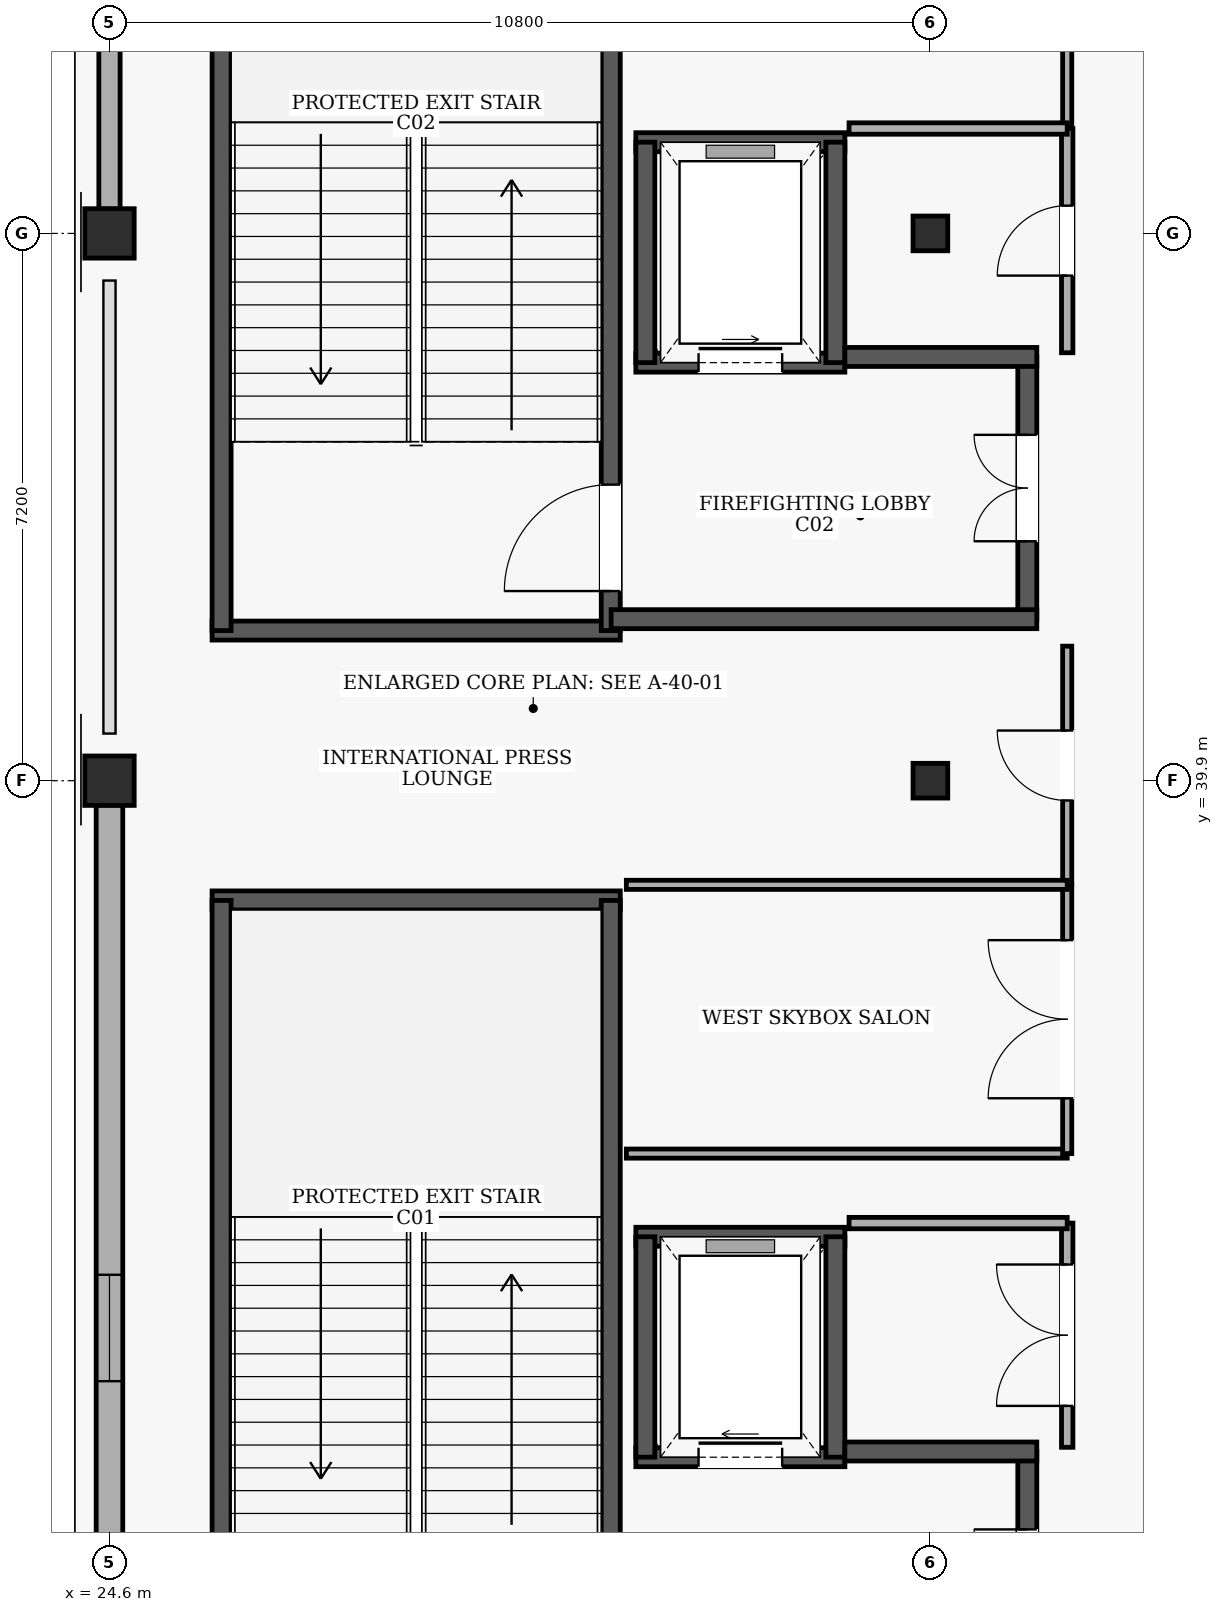
"""IFC4 building model, lengths in metres.
Left out: names, types, materials, properties, quantities, classifications, styles, units other than length and angle.
Written with IfcOpenShell. Run it as: python <this file> out.ifc"""

import sys

from ifc_helpers import new_model, si_unit, direction, frame, frame_2d, origin, origin_2d, place, context, subcontext, project, spatial, rectangle, hollow_circle, extrude, element, fill, save


model = new_model("IFC4")
c1 = context("Model", 3, precision=1e-05, world=origin(), true_north=direction((0.0, 1.0)))
c2 = subcontext(c1, "Body", "Model", "MODEL_VIEW")
j1 = project(units=[si_unit("LENGTHUNIT", "METRE"), si_unit("PLANEANGLEUNIT", "RADIAN")], contexts=[c1])
p1 = place(None, origin())
s1 = spatial("IfcSite", under=j1, at=p1, CompositionType="ELEMENT")
p2 = place(p1, origin())
s2 = spatial("IfcBuilding", under=s1, at=p2, CompositionType="ELEMENT")
p3 = place(p2, frame((0.0, 0.0, 19.8)))
s3 = spatial("IfcBuildingStorey", under=s2, at=p3, CompositionType="ELEMENT", Elevation=19.8)
for number, where, z_axis, x_axis in (
    (1, (24.6, 39.9, 0.0), (0.0, 0.0, 1.0), (1.0, 0.0, 0.0)),
    (2, (24.6, 47.1, 0.0), (0.0, 0.0, 1.0), (1.0, 0.0, 0.0)),
):
    element("IfcColumn", number, at=place(p3, frame(where, z_axis=z_axis, x_axis=x_axis)), inside=s3, PredefinedType="COLUMN", context=c2, shape_type="SweptSolid", body=[
        extrude(rectangle(XDim=0.65, YDim=0.65, at=origin_2d()), origin(), (0.0, 0.0, 1.0), 4.8),
    ])
for number, where, z_axis, x_axis in (
    (3, (35.4, 39.9, 0.0), (0.0, 0.0, 1.0), (1.0, 0.0, 0.0)),
    (4, (35.4, 47.1, 0.0), (0.0, 0.0, 1.0), (1.0, 0.0, 0.0)),
):
    element("IfcColumn", number, at=place(p3, frame(where, z_axis=z_axis, x_axis=x_axis)), inside=s3, PredefinedType="COLUMN", context=c2, shape_type="SweptSolid", body=[
        extrude(hollow_circle(Radius=0.229, WallThickness=0.02, at=origin_2d()), origin(), (0.0, 0.0, 1.0), 4.8),
    ])
p4 = place(p3, frame((24.6, 25.82, 0.0), z_axis=(0.0, 0.0, 1.0), x_axis=(0.0, 1.0, 0.0)))
e5 = element("IfcWall", 5, at=p4, inside=s3, PredefinedType="SOLIDWALL", context=c2, shape_type="SweptSolid", body=[
    extrude(rectangle(XDim=13.76, YDim=0.35, at=frame_2d((6.88, 0.0))), origin(), (0.0, 0.0, 1.0), 3.58),
])
p5 = place(p4, frame((6.18, 0.0, 0.9)))
e6 = element("IfcOpeningElement", 6, at=p5, cuts=e5, PredefinedType="OPENING", context=c2, shape_type="SweptSolid", body=[
    extrude(rectangle(XDim=1.4, YDim=1.5, at=frame_2d((0.7, 0.75))), frame((0.0, 0.185, 0.0), z_axis=(0.0, -1.0, 0.0), x_axis=(1.0, 0.0, 0.0)), (0.0, 0.0, 1.0), 0.37),
])
p6 = place(p3, frame((24.6, 47.42, 0.0), z_axis=(0.0, 0.0, 1.0), x_axis=(0.0, 1.0, 0.0)))
e7 = element("IfcWall", 7, at=p6, inside=s3, PredefinedType="SOLIDWALL", context=c2, shape_type="SweptSolid", body=[
    extrude(rectangle(XDim=6.56, YDim=0.28, at=frame_2d((3.28, 0.0))), origin(), (0.0, 0.0, 1.0), 3.88),
])
p7 = place(p6, frame((2.48, 0.0, 0.9)))
e8 = element("IfcOpeningElement", 8, at=p7, cuts=e7, PredefinedType="OPENING", context=c2, shape_type="SweptSolid", body=[
    extrude(rectangle(XDim=1.6, YDim=1.5, at=frame_2d((0.8, 0.75))), frame((0.0, 0.15, 0.0), z_axis=(0.0, -1.0, 0.0), x_axis=(1.0, 0.0, 0.0)), (0.0, 0.0, 1.0), 0.3),
])
p8 = place(p3, frame((31.32, 38.325, 0.0), z_axis=(0.0, 0.0, 1.0), x_axis=(-1.0, 0.0, 0.0)))
e9 = element("IfcWall", 9, at=p8, inside=s3, PredefinedType="SHEAR", context=c2, shape_type="SweptSolid", body=[
    extrude(rectangle(XDim=5.37, YDim=0.25, at=frame_2d((2.685, 0.0))), origin(), (0.0, 0.0, 1.0), 4.5),
])
p9 = place(p3, frame((26.075, 27.475, 0.0), z_axis=(0.0, 0.0, 1.0), x_axis=(0.0, 1.0, 0.0)))
e10 = element("IfcWall", 10, at=p9, inside=s3, PredefinedType="SHEAR", context=c2, shape_type="SweptSolid", body=[
    extrude(rectangle(XDim=10.85, YDim=0.25, at=frame_2d((5.425, 0.0))), origin(), (0.0, 0.0, 1.0), 4.5),
])
p10 = place(p3, frame((31.195, 27.475, 0.0), z_axis=(0.0, 0.0, 1.0), x_axis=(0.0, 1.0, 0.0)))
e11 = element("IfcWall", 11, at=p10, inside=s3, PredefinedType="SHEAR", context=c2, shape_type="SweptSolid", body=[
    extrude(rectangle(XDim=10.85, YDim=0.25, at=frame_2d((5.425, 0.0))), origin(), (0.0, 0.0, 1.0), 4.5),
])
p11 = place(p10, frame((0.52, 0.0, 0.0)))
e12 = element("IfcOpeningElement", 12, at=p11, cuts=e11, PredefinedType="OPENING", context=c2, shape_type="SweptSolid", body=[
    extrude(rectangle(XDim=1.4, YDim=2.15, at=frame_2d((0.7, 1.075))), frame((0.0, 0.135, 0.0), z_axis=(0.0, -1.0, 0.0), x_axis=(1.0, 0.0, 0.0)), (0.0, 0.0, 1.0), 0.27),
])
p12 = place(p3, frame((25.95, 41.875, 0.0), z_axis=(0.0, 0.0, 1.0), x_axis=(1.0, 0.0, 0.0)))
e13 = element("IfcWall", 13, at=p12, inside=s3, PredefinedType="SHEAR", context=c2, shape_type="SweptSolid", body=[
    extrude(rectangle(XDim=5.37, YDim=0.25, at=frame_2d((2.685, 0.0))), origin(), (0.0, 0.0, 1.0), 4.5),
])
p13 = place(p3, frame((26.075, 41.875, 0.0), z_axis=(0.0, 0.0, 1.0), x_axis=(0.0, 1.0, 0.0)))
e14 = element("IfcWall", 14, at=p13, inside=s3, PredefinedType="SHEAR", context=c2, shape_type="SweptSolid", body=[
    extrude(rectangle(XDim=10.85, YDim=0.25, at=frame_2d((5.425, 0.0))), origin(), (0.0, 0.0, 1.0), 4.5),
])
p14 = place(p3, frame((31.195, 41.875, 0.0), z_axis=(0.0, 0.0, 1.0), x_axis=(0.0, 1.0, 0.0)))
e15 = element("IfcWall", 15, at=p14, inside=s3, PredefinedType="SHEAR", context=c2, shape_type="SweptSolid", body=[
    extrude(rectangle(XDim=10.85, YDim=0.25, at=frame_2d((5.425, 0.0))), origin(), (0.0, 0.0, 1.0), 4.5),
])
p15 = place(p14, frame((0.52, 0.0, 0.0)))
e16 = element("IfcOpeningElement", 16, at=p15, cuts=e15, PredefinedType="OPENING", context=c2, shape_type="SweptSolid", body=[
    extrude(rectangle(XDim=1.4, YDim=2.15, at=frame_2d((0.7, 1.075))), frame((0.0, 0.135, 0.0), z_axis=(0.0, -1.0, 0.0), x_axis=(1.0, 0.0, 0.0)), (0.0, 0.0, 1.0), 0.27),
])
p16 = place(p3, frame((31.525, 31.0, 0.0), z_axis=(0.0, 0.0, 1.0), x_axis=(1.0, 0.0, 0.0)))
e17 = element("IfcWall", 17, at=p16, inside=s3, PredefinedType="SHEAR", context=c2, shape_type="SweptSolid", body=[
    extrude(rectangle(XDim=2.75, YDim=0.25, at=frame_2d((1.375, 0.0))), origin(), (0.0, 0.0, 1.0), 4.5),
])
p17 = place(p16, frame((0.825, 0.0, 0.0)))
e18 = element("IfcOpeningElement", 18, at=p17, cuts=e17, PredefinedType="OPENING", context=c2, shape_type="SweptSolid", body=[
    extrude(rectangle(XDim=1.1, YDim=2.15, at=frame_2d((0.55, 1.075))), frame((0.0, 0.135, 0.0), z_axis=(0.0, -1.0, 0.0), x_axis=(1.0, 0.0, 0.0)), (0.0, 0.0, 1.0), 0.27),
])
p18 = place(p3, frame((34.275, 33.9, 0.0), z_axis=(0.0, 0.0, 1.0), x_axis=(-1.0, 0.0, 0.0)))
e19 = element("IfcWall", 19, at=p18, inside=s3, PredefinedType="SHEAR", context=c2, shape_type="SweptSolid", body=[
    extrude(rectangle(XDim=2.75, YDim=0.25, at=frame_2d((1.375, 0.0))), origin(), (0.0, 0.0, 1.0), 4.5),
])
for number, where, z_axis, x_axis in (
    (20, (31.65, 33.9, 0.0), (0.0, 0.0, 1.0), (0.0, -1.0, 0.0)),
    (21, (34.15, 31.0, 0.0), (0.0, 0.0, 1.0), (0.0, 1.0, 0.0)),
):
    element("IfcWall", number, at=place(p3, frame(where, z_axis=z_axis, x_axis=x_axis)), inside=s3, PredefinedType="SHEAR", context=c2, shape_type="SweptSolid", body=[
        extrude(rectangle(XDim=2.9, YDim=0.25, at=frame_2d((1.45, 0.0))), origin(), (0.0, 0.0, 1.0), 4.5),
    ])
p19 = place(p3, frame((36.675, 27.625, 0.0), z_axis=(0.0, 0.0, 1.0), x_axis=(0.0, 1.0, 0.0)))
e22 = element("IfcWall", 22, at=p19, inside=s3, PredefinedType="SHEAR", context=c2, shape_type="SweptSolid", body=[
    extrude(rectangle(XDim=3.45, YDim=0.25, at=frame_2d((1.725, 0.0))), origin(), (0.0, 0.0, 1.0), 4.5),
])
p20 = place(p19, frame((1.025, 0.0, 0.0)))
e23 = element("IfcOpeningElement", 23, at=p20, cuts=e22, PredefinedType="OPENING", context=c2, shape_type="SweptSolid", body=[
    extrude(rectangle(XDim=1.4, YDim=2.15, at=frame_2d((0.7, 1.075))), frame((0.0, 0.135, 0.0), z_axis=(0.0, -1.0, 0.0), x_axis=(1.0, 0.0, 0.0)), (0.0, 0.0, 1.0), 0.27),
])
p21 = place(p3, frame((34.275, 31.075, 0.0), z_axis=(0.0, 0.0, 1.0), x_axis=(1.0, 0.0, 0.0)))
e24 = element("IfcWall", 24, at=p21, inside=s3, PredefinedType="SHEAR", context=c2, shape_type="SweptSolid", body=[
    extrude(rectangle(XDim=2.525, YDim=0.25, at=frame_2d((1.263, 0.0))), origin(), (0.0, 0.0, 1.0), 4.5),
])
p22 = place(p3, frame((31.525, 45.4, 0.0), z_axis=(0.0, 0.0, 1.0), x_axis=(1.0, 0.0, 0.0)))
e25 = element("IfcWall", 25, at=p22, inside=s3, PredefinedType="SHEAR", context=c2, shape_type="SweptSolid", body=[
    extrude(rectangle(XDim=2.75, YDim=0.25, at=frame_2d((1.375, 0.0))), origin(), (0.0, 0.0, 1.0), 4.5),
])
p23 = place(p22, frame((0.825, 0.0, 0.0)))
e26 = element("IfcOpeningElement", 26, at=p23, cuts=e25, PredefinedType="OPENING", context=c2, shape_type="SweptSolid", body=[
    extrude(rectangle(XDim=1.1, YDim=2.15, at=frame_2d((0.55, 1.075))), frame((0.0, 0.135, 0.0), z_axis=(0.0, -1.0, 0.0), x_axis=(1.0, 0.0, 0.0)), (0.0, 0.0, 1.0), 0.27),
])
p24 = place(p3, frame((34.275, 48.3, 0.0), z_axis=(0.0, 0.0, 1.0), x_axis=(-1.0, 0.0, 0.0)))
e27 = element("IfcWall", 27, at=p24, inside=s3, PredefinedType="SHEAR", context=c2, shape_type="SweptSolid", body=[
    extrude(rectangle(XDim=2.75, YDim=0.25, at=frame_2d((1.375, 0.0))), origin(), (0.0, 0.0, 1.0), 4.5),
])
for number, where, z_axis, x_axis in (
    (28, (31.65, 48.3, 0.0), (0.0, 0.0, 1.0), (0.0, -1.0, 0.0)),
    (29, (34.15, 45.4, 0.0), (0.0, 0.0, 1.0), (0.0, 1.0, 0.0)),
):
    element("IfcWall", number, at=place(p3, frame(where, z_axis=z_axis, x_axis=x_axis)), inside=s3, PredefinedType="SHEAR", context=c2, shape_type="SweptSolid", body=[
        extrude(rectangle(XDim=2.9, YDim=0.25, at=frame_2d((1.45, 0.0))), origin(), (0.0, 0.0, 1.0), 4.5),
    ])
p25 = place(p3, frame((36.675, 42.025, 0.0), z_axis=(0.0, 0.0, 1.0), x_axis=(0.0, 1.0, 0.0)))
e30 = element("IfcWall", 30, at=p25, inside=s3, PredefinedType="SHEAR", context=c2, shape_type="SweptSolid", body=[
    extrude(rectangle(XDim=3.45, YDim=0.25, at=frame_2d((1.725, 0.0))), origin(), (0.0, 0.0, 1.0), 4.5),
])
p26 = place(p25, frame((1.025, 0.0, 0.0)))
e31 = element("IfcOpeningElement", 31, at=p26, cuts=e30, PredefinedType="OPENING", context=c2, shape_type="SweptSolid", body=[
    extrude(rectangle(XDim=1.4, YDim=2.15, at=frame_2d((0.7, 1.075))), frame((0.0, 0.135, 0.0), z_axis=(0.0, -1.0, 0.0), x_axis=(1.0, 0.0, 0.0)), (0.0, 0.0, 1.0), 0.27),
])
p27 = place(p3, frame((34.275, 45.475, 0.0), z_axis=(0.0, 0.0, 1.0), x_axis=(1.0, 0.0, 0.0)))
e32 = element("IfcWall", 32, at=p27, inside=s3, PredefinedType="SHEAR", context=c2, shape_type="SweptSolid", body=[
    extrude(rectangle(XDim=2.525, YDim=0.25, at=frame_2d((1.263, 0.0))), origin(), (0.0, 0.0, 1.0), 4.5),
])
p28 = place(p3, frame((31.2, 42.025, 0.0), z_axis=(0.0, 0.0, 1.0), x_axis=(1.0, 0.0, 0.0)))
e33 = element("IfcWall", 33, at=p28, inside=s3, PredefinedType="SHEAR", context=c2, shape_type="SweptSolid", body=[
    extrude(rectangle(XDim=5.6, YDim=0.25, at=frame_2d((2.8, 0.0))), origin(), (0.0, 0.0, 1.0), 4.5),
])
p29 = place(p3, frame((37.2, 31.13, 0.0), z_axis=(0.0, 0.0, 1.0), x_axis=(0.0, 1.0, 0.0)))
e34 = element("IfcWall", 34, at=p29, inside=s3, PredefinedType="PARTITIONING", context=c2, shape_type="SweptSolid", body=[
    extrude(rectangle(XDim=2.95, YDim=0.15, at=frame_2d((1.475, 0.0))), origin(), (0.0, 0.0, 1.0), 4.5),
])
p30 = place(p29, frame((0.545, 0.0, 0.0)))
e35 = element("IfcOpeningElement", 35, at=p30, cuts=e34, PredefinedType="OPENING", context=c2, shape_type="SweptSolid", body=[
    extrude(rectangle(XDim=1.86, YDim=2.3, at=frame_2d((0.93, 1.15))), frame((0.0, 0.085, 0.0), z_axis=(0.0, -1.0, 0.0), x_axis=(1.0, 0.0, 0.0)), (0.0, 0.0, 1.0), 0.17),
])
p31 = place(p3, frame((37.2, 34.08, 0.0), z_axis=(0.0, 0.0, 1.0), x_axis=(-1.0, 0.0, 0.0)))
e36 = element("IfcWall", 36, at=p31, inside=s3, PredefinedType="PARTITIONING", context=c2, shape_type="SweptSolid", body=[
    extrude(rectangle(XDim=2.87, YDim=0.15, at=frame_2d((1.435, 0.0))), origin(), (0.0, 0.0, 1.0), 4.5),
])
p32 = place(p3, frame((37.2, 38.53, 0.0), z_axis=(0.0, 0.0, 1.0), x_axis=(0.0, 1.0, 0.0)))
e37 = element("IfcWall", 37, at=p32, inside=s3, PredefinedType="PARTITIONING", context=c2, shape_type="SweptSolid", body=[
    extrude(rectangle(XDim=3.14, YDim=0.12, at=frame_2d((1.57, 0.0))), origin(), (0.0, 0.0, 1.0), 4.5),
])
p33 = place(p32, frame((1.11, 0.0, 0.0)))
e38 = element("IfcOpeningElement", 38, at=p33, cuts=e37, PredefinedType="OPENING", context=c2, shape_type="SweptSolid", body=[
    extrude(rectangle(XDim=0.92, YDim=2.1, at=frame_2d((0.46, 1.05))), frame((0.0, 0.07, 0.0), z_axis=(0.0, -1.0, 0.0), x_axis=(1.0, 0.0, 0.0)), (0.0, 0.0, 1.0), 0.14),
])
p34 = place(p3, frame((31.4, 34.994, 0.0), z_axis=(0.0, 0.0, 1.0), x_axis=(1.0, 0.0, 0.0)))
e39 = element("IfcWall", 39, at=p34, inside=s3, PredefinedType="PARTITIONING", context=c2, shape_type="SweptSolid", body=[
    extrude(rectangle(XDim=5.8, YDim=0.12, at=frame_2d((2.9, 0.0))), origin(), (0.0, 0.0, 1.0), 4.5),
])
p35 = place(p3, frame((37.2, 34.994, 0.0), z_axis=(0.0, 0.0, 1.0), x_axis=(0.0, 1.0, 0.0)))
e40 = element("IfcWall", 40, at=p35, inside=s3, PredefinedType="PARTITIONING", context=c2, shape_type="SweptSolid", body=[
    extrude(rectangle(XDim=3.536, YDim=0.12, at=frame_2d((1.768, 0.0))), origin(), (0.0, 0.0, 1.0), 4.5),
])
p36 = place(p35, frame((0.728, 0.0, 0.0)))
e41 = element("IfcOpeningElement", 41, at=p36, cuts=e40, PredefinedType="OPENING", context=c2, shape_type="SweptSolid", body=[
    extrude(rectangle(XDim=2.08, YDim=2.35, at=frame_2d((1.04, 1.175))), frame((0.0, 0.07, 0.0), z_axis=(0.0, -1.0, 0.0), x_axis=(1.0, 0.0, 0.0)), (0.0, 0.0, 1.0), 0.14),
])
p37 = place(p3, frame((37.2, 38.53, 0.0), z_axis=(0.0, 0.0, 1.0), x_axis=(-1.0, 0.0, 0.0)))
e42 = element("IfcWall", 42, at=p37, inside=s3, PredefinedType="PARTITIONING", context=c2, shape_type="SweptSolid", body=[
    extrude(rectangle(XDim=5.8, YDim=0.12, at=frame_2d((2.9, 0.0))), origin(), (0.0, 0.0, 1.0), 4.5),
])
p38 = place(p3, frame((37.2, 48.48, 0.0), z_axis=(0.0, 0.0, 1.0), x_axis=(0.0, 1.0, 0.0)))
e43 = element("IfcWall", 43, at=p38, inside=s3, PredefinedType="PARTITIONING", context=c2, shape_type="SweptSolid", body=[
    extrude(rectangle(XDim=4.45, YDim=0.12, at=frame_2d((2.225, 0.0))), origin(), (0.0, 0.0, 1.0), 4.5),
])
p39 = place(p38, frame((1.145, 0.0, 0.0)))
e44 = element("IfcOpeningElement", 44, at=p39, cuts=e43, PredefinedType="OPENING", context=c2, shape_type="SweptSolid", body=[
    extrude(rectangle(XDim=2.16, YDim=2.35, at=frame_2d((1.08, 1.175))), frame((0.0, 0.07, 0.0), z_axis=(0.0, -1.0, 0.0), x_axis=(1.0, 0.0, 0.0)), (0.0, 0.0, 1.0), 0.14),
])
p40 = place(p3, frame((37.2, 45.53, 0.0), z_axis=(0.0, 0.0, 1.0), x_axis=(0.0, 1.0, 0.0)))
e45 = element("IfcWall", 45, at=p40, inside=s3, PredefinedType="PARTITIONING", context=c2, shape_type="SweptSolid", body=[
    extrude(rectangle(XDim=2.95, YDim=0.15, at=frame_2d((1.475, 0.0))), origin(), (0.0, 0.0, 1.0), 4.5),
])
p41 = place(p40, frame((1.015, 0.0, 0.0)))
e46 = element("IfcOpeningElement", 46, at=p41, cuts=e45, PredefinedType="OPENING", context=c2, shape_type="SweptSolid", body=[
    extrude(rectangle(XDim=0.92, YDim=2.1, at=frame_2d((0.46, 1.05))), frame((0.0, 0.085, 0.0), z_axis=(0.0, -1.0, 0.0), x_axis=(1.0, 0.0, 0.0)), (0.0, 0.0, 1.0), 0.17),
])
p42 = place(p3, frame((37.2, 48.48, 0.0), z_axis=(0.0, 0.0, 1.0), x_axis=(-1.0, 0.0, 0.0)))
e47 = element("IfcWall", 47, at=p42, inside=s3, PredefinedType="PARTITIONING", context=c2, shape_type="SweptSolid", body=[
    extrude(rectangle(XDim=2.87, YDim=0.15, at=frame_2d((1.435, 0.0))), origin(), (0.0, 0.0, 1.0), 4.5),
])
p43 = place(p5, origin())
e48 = element("IfcWindow", 48, at=p43, inside=s3, PartitioningType="SINGLE_PANEL", PredefinedType="WINDOW", context=c2, shape_type="SweptSolid", body=[
    extrude(rectangle(XDim=1.4, YDim=1.5, at=frame_2d((0.7, 0.75))), frame((0.0, 0.03, 0.0), z_axis=(0.0, -1.0, 0.0), x_axis=(1.0, 0.0, 0.0)), (0.0, 0.0, 1.0), 0.06),
])
fill(e6, e48)
p44 = place(p15, origin())
e49 = element("IfcDoor", 49, at=p44, inside=s3, OperationType="SINGLE_SWING_LEFT", PredefinedType="DOOR", context=c2, shape_type="SweptSolid", body=[
    extrude(rectangle(XDim=1.4, YDim=2.15, at=frame_2d((0.7, 1.075))), frame((0.0, 0.025, 0.0), z_axis=(0.0, -1.0, 0.0), x_axis=(1.0, 0.0, 0.0)), (0.0, 0.0, 1.0), 0.05),
])
fill(e16, e49)
p45 = place(p17, origin())
e50 = element("IfcDoor", 50, at=p45, inside=s3, OperationType="SLIDING_TO_RIGHT", PredefinedType="DOOR", context=c2, shape_type="SweptSolid", body=[
    extrude(rectangle(XDim=1.1, YDim=2.15, at=frame_2d((0.55, 1.075))), frame((0.0, 0.025, 0.0), z_axis=(0.0, -1.0, 0.0), x_axis=(1.0, 0.0, 0.0)), (0.0, 0.0, 1.0), 0.05),
])
fill(e18, e50)
p46 = place(p20, origin())
e51 = element("IfcDoor", 51, at=p46, inside=s3, OperationType="DOUBLE_DOOR_SINGLE_SWING", PredefinedType="DOOR", context=c2, shape_type="SweptSolid", body=[
    extrude(rectangle(XDim=1.4, YDim=2.15, at=frame_2d((0.7, 1.075))), frame((0.0, 0.025, 0.0), z_axis=(0.0, -1.0, 0.0), x_axis=(1.0, 0.0, 0.0)), (0.0, 0.0, 1.0), 0.05),
])
fill(e23, e51)
p47 = place(p23, origin())
e52 = element("IfcDoor", 52, at=p47, inside=s3, OperationType="SLIDING_TO_LEFT", PredefinedType="DOOR", context=c2, shape_type="SweptSolid", body=[
    extrude(rectangle(XDim=1.1, YDim=2.15, at=frame_2d((0.55, 1.075))), frame((0.0, 0.025, 0.0), z_axis=(0.0, -1.0, 0.0), x_axis=(1.0, 0.0, 0.0)), (0.0, 0.0, 1.0), 0.05),
])
fill(e26, e52)
p48 = place(p26, origin())
e53 = element("IfcDoor", 53, at=p48, inside=s3, OperationType="DOUBLE_DOOR_SINGLE_SWING", PredefinedType="DOOR", context=c2, shape_type="SweptSolid", body=[
    extrude(rectangle(XDim=1.4, YDim=2.15, at=frame_2d((0.7, 1.075))), frame((0.0, 0.025, 0.0), z_axis=(0.0, -1.0, 0.0), x_axis=(1.0, 0.0, 0.0)), (0.0, 0.0, 1.0), 0.05),
])
fill(e31, e53)
p49 = place(p30, origin())
e54 = element("IfcDoor", 54, at=p49, inside=s3, OperationType="DOUBLE_DOOR_SINGLE_SWING", PredefinedType="DOOR", context=c2, shape_type="SweptSolid", body=[
    extrude(rectangle(XDim=1.86, YDim=2.3, at=frame_2d((0.93, 1.15))), frame((0.0, 0.025, 0.0), z_axis=(0.0, -1.0, 0.0), x_axis=(1.0, 0.0, 0.0)), (0.0, 0.0, 1.0), 0.05),
])
fill(e35, e54)
p50 = place(p33, origin())
e55 = element("IfcDoor", 55, at=p50, inside=s3, OperationType="SINGLE_SWING_RIGHT", PredefinedType="DOOR", context=c2, shape_type="SweptSolid", body=[
    extrude(rectangle(XDim=0.92, YDim=2.1, at=frame_2d((0.46, 1.05))), frame((0.0, 0.025, 0.0), z_axis=(0.0, -1.0, 0.0), x_axis=(1.0, 0.0, 0.0)), (0.0, 0.0, 1.0), 0.05),
])
fill(e38, e55)
p51 = place(p36, origin())
e56 = element("IfcDoor", 56, at=p51, inside=s3, OperationType="DOUBLE_DOOR_SINGLE_SWING", PredefinedType="DOOR", context=c2, shape_type="SweptSolid", body=[
    extrude(rectangle(XDim=2.08, YDim=2.35, at=frame_2d((1.04, 1.175))), frame((0.0, 0.025, 0.0), z_axis=(0.0, -1.0, 0.0), x_axis=(1.0, 0.0, 0.0)), (0.0, 0.0, 1.0), 0.05),
])
fill(e41, e56)
p52 = place(p41, origin())
e57 = element("IfcDoor", 57, at=p52, inside=s3, OperationType="SINGLE_SWING_LEFT", PredefinedType="DOOR", context=c2, shape_type="SweptSolid", body=[
    extrude(rectangle(XDim=0.92, YDim=2.1, at=frame_2d((0.46, 1.05))), frame((0.0, 0.025, 0.0), z_axis=(0.0, -1.0, 0.0), x_axis=(1.0, 0.0, 0.0)), (0.0, 0.0, 1.0), 0.05),
])
fill(e46, e57)
save(model, sys.argv[1])
